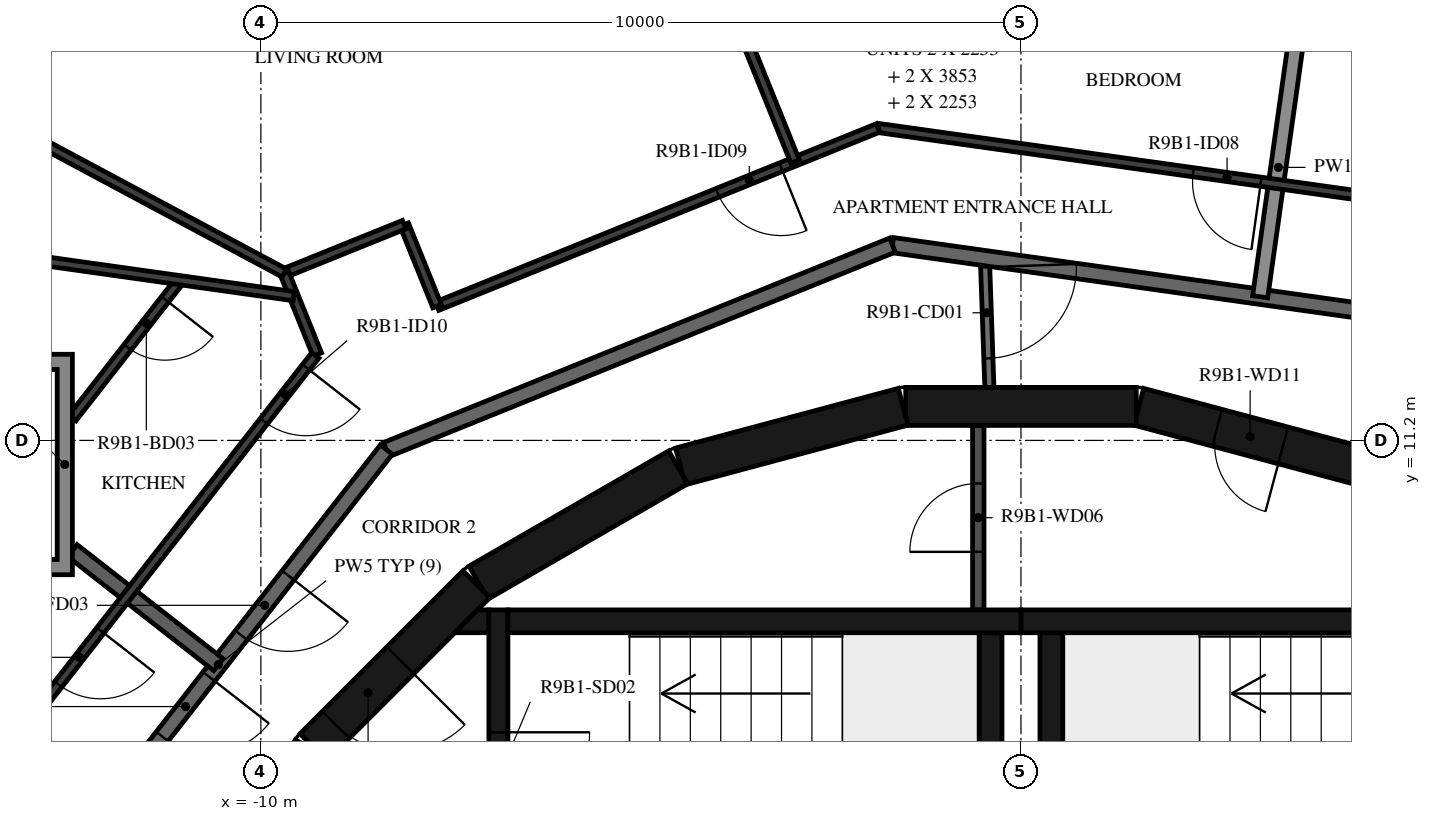
"""IFC4 building model, lengths in metres.
Left out: names, types, materials, properties, quantities, classifications, styles, units other than length and angle.
Written with IfcOpenShell. Run it as: python <this file> out.ifc"""

import sys

from ifc_helpers import new_model, si_unit, direction, frame, frame_2d, origin, place, context, subcontext, project, spatial, polyline, rectangle, outline, extrude, element, fill, save


model = new_model("IFC4")
c1 = context("Model", 3, precision=1e-05, world=origin(), true_north=direction((0.0, 1.0)))
c2 = subcontext(c1, "Body", "Model", "MODEL_VIEW")
j1 = project(units=[si_unit("LENGTHUNIT", "METRE"), si_unit("PLANEANGLEUNIT", "RADIAN")], contexts=[c1])
p1 = place(None, origin())
s1 = spatial("IfcSite", under=j1, at=p1, CompositionType="ELEMENT")
p2 = place(p1, origin())
s2 = spatial("IfcBuilding", under=s1, at=p2, CompositionType="ELEMENT")
p3 = place(p2, frame((0.0, 0.0, 343.5)))
s3 = spatial("IfcBuildingStorey", under=s2, at=p3, CompositionType="ELEMENT", Elevation=343.5)
p4 = place(p3, frame((4.479, 10.858, 0.0), z_axis=(0.0, 0.0, 1.0), x_axis=(-0.965948410781, 0.258734743916, 0.0)))
e1 = element("IfcWall", 1, at=p4, inside=s3, PredefinedType="SHEAR", context=c2, shape_type="SweptSolid", body=[
    extrude(rectangle(XDim=3.033, YDim=0.5, at=frame_2d((1.516, 0.0))), origin(), (0.0, 0.0, 1.0), 3.12),
])
p5 = place(p4, frame((1.066, 0.0, 0.0)))
e2 = element("IfcOpeningElement", 2, at=p5, cuts=e1, PredefinedType="OPENING", context=c2, shape_type="SweptSolid", body=[
    extrude(rectangle(XDim=0.9, YDim=2.1, at=frame_2d((0.45, 1.05))), frame((0.0, 0.26, 0.0), z_axis=(0.0, -1.0, 0.0), x_axis=(1.0, 0.0, 0.0)), (0.0, 0.0, 1.0), 0.52),
])
for number, where, z_axis, x_axis in (
    (3, (1.516, 11.647, 0.0), (0.0, 0.0, 1.0), (-1.0, 0.0, 0.0)),
    (4, (-1.55, 11.643, 0.0), (0.0, 0.0, 1.0), (-0.966, -0.259, 0.0)),
    (5, (-4.51, 10.845, 0.0), (0.0, 0.0, 1.0), (-0.866, -0.5, 0.0)),
):
    element("IfcWall", number, at=place(p3, frame(where, z_axis=z_axis, x_axis=x_axis)), inside=s3, PredefinedType="SHEAR", context=c2, shape_type="SweptSolid", body=[
        extrude(rectangle(XDim=3.033, YDim=0.5, at=frame_2d((1.516, 0.0))), origin(), (0.0, 0.0, 1.0), 3.12),
    ])
p6 = place(p3, frame((-7.164, 9.308, 0.0), z_axis=(0.0, 0.0, 1.0), x_axis=(-0.707106781187, -0.707106781187, 0.0)))
e6 = element("IfcWall", 6, at=p6, inside=s3, PredefinedType="SHEAR", context=c2, shape_type="SweptSolid", body=[
    extrude(rectangle(XDim=3.032, YDim=0.5, at=frame_2d((1.516, 0.0))), origin(), (0.0, 0.0, 1.0), 3.12),
])
p7 = place(p6, frame((1.416, 0.0, 0.0)))
e7 = element("IfcOpeningElement", 7, at=p7, cuts=e6, PredefinedType="OPENING", context=c2, shape_type="SweptSolid", body=[
    extrude(rectangle(XDim=1.2, YDim=2.1, at=frame_2d((0.6, 1.05))), frame((0.0, 0.26, 0.0), z_axis=(0.0, -1.0, 0.0), x_axis=(1.0, 0.0, 0.0)), (0.0, 0.0, 1.0), 0.52),
])
p8 = place(p3, frame((-9.329, 7.137, 0.0), z_axis=(0.0, 0.0, 1.0), x_axis=(-0.500087131594, -0.865975092491, 0.0)))
e8 = element("IfcWall", 8, at=p8, inside=s3, PredefinedType="SHEAR", context=c2, shape_type="SweptSolid", body=[
    extrude(rectangle(XDim=3.033, YDim=0.5, at=frame_2d((1.516, 0.0))), origin(), (0.0, 0.0, 1.0), 3.12),
])
p9 = place(p3, frame((0.0, 8.82, 0.0), z_axis=(0.0, 0.0, 1.0), x_axis=(1.0, 0.0, 0.0)))
e9 = element("IfcWall", 9, at=p9, inside=s3, PredefinedType="SHEAR", context=c2, shape_type="SweptSolid", body=[
    extrude(rectangle(XDim=6.75, YDim=0.3, at=frame_2d((3.375, 0.0))), origin(), (0.0, 0.0, 1.0), 3.12),
])
p10 = place(p3, frame((0.4, 5.35, 0.0), z_axis=(0.0, 0.0, 1.0), x_axis=(0.0, 1.0, 0.0)))
e10 = element("IfcWall", 10, at=p10, inside=s3, PredefinedType="SHEAR", context=c2, shape_type="SweptSolid", body=[
    extrude(rectangle(XDim=3.32, YDim=0.3, at=frame_2d((1.66, 0.0))), origin(), (0.0, 0.0, 1.0), 3.12),
])
p11 = place(p3, frame((-6.75, 8.82, 0.0), z_axis=(0.0, 0.0, 1.0), x_axis=(1.0, 0.0, 0.0)))
e11 = element("IfcWall", 11, at=p11, inside=s3, PredefinedType="SHEAR", context=c2, shape_type="SweptSolid", body=[
    extrude(rectangle(XDim=6.75, YDim=0.3, at=frame_2d((3.375, 0.0))), origin(), (0.0, 0.0, 1.0), 3.12),
])
p12 = place(p3, frame((-0.4, 5.35, 0.0), z_axis=(0.0, 0.0, 1.0), x_axis=(0.0, 1.0, 0.0)))
e12 = element("IfcWall", 12, at=p12, inside=s3, PredefinedType="SHEAR", context=c2, shape_type="SweptSolid", body=[
    extrude(rectangle(XDim=3.32, YDim=0.3, at=frame_2d((1.66, 0.0))), origin(), (0.0, 0.0, 1.0), 3.12),
])
p13 = place(p3, frame((-6.875, 8.97, 0.0), z_axis=(0.0, 0.0, 1.0), x_axis=(0.0, -1.0, 0.0)))
e13 = element("IfcWall", 13, at=p13, inside=s3, PredefinedType="SHEAR", context=c2, shape_type="SweptSolid", body=[
    extrude(rectangle(XDim=3.92, YDim=0.25, at=frame_2d((1.96, 0.0))), origin(), (0.0, 0.0, 1.0), 3.12),
])
p14 = place(p13, frame((1.61, 0.0, 0.0)))
e14 = element("IfcOpeningElement", 14, at=p14, cuts=e13, PredefinedType="OPENING", context=c2, shape_type="SweptSolid", body=[
    extrude(rectangle(XDim=1.2, YDim=2.1, at=frame_2d((0.6, 1.05))), frame((0.0, 0.135, 0.0), z_axis=(0.0, -1.0, 0.0), x_axis=(1.0, 0.0, 0.0)), (0.0, 0.0, 1.0), 0.27),
])
p15 = place(p3, origin())
e15 = element("IfcWall", 15, at=p15, inside=s3, PredefinedType="SHEAR", context=c2, shape_type="SweptSolid", body=[
    extrude(outline(polyline([(-7.148, 8.97), (-7.0, 8.97), (-7.0, 8.67), (-7.448, 8.67), (-7.148, 8.97)])), origin(), (0.0, 0.0, 1.0), 3.12),
])
p16 = place(p3, frame((-0.562, 8.97, 0.0), z_axis=(0.0, 0.0, 1.0), x_axis=(0.0, 1.0, 0.0)))
e16 = element("IfcWall", 16, at=p16, inside=s3, PredefinedType="PARTITIONING", context=c2, shape_type="SweptSolid", body=[
    extrude(rectangle(XDim=2.427, YDim=0.15, at=frame_2d((1.214, 0.0))), origin(), (0.0, 0.0, 1.0), 3.12),
])
p17 = place(p16, frame((0.764, 0.0, 0.0)))
e17 = element("IfcOpeningElement", 17, at=p17, cuts=e16, PredefinedType="OPENING", context=c2, shape_type="SweptSolid", body=[
    extrude(rectangle(XDim=0.9, YDim=2.1, at=frame_2d((0.45, 1.05))), frame((0.0, 0.085, 0.0), z_axis=(0.0, -1.0, 0.0), x_axis=(1.0, 0.0, 0.0)), (0.0, 0.0, 1.0), 0.17),
])
p18 = place(p3, frame((-0.475, 13.598, 0.0), z_axis=(0.0, 0.0, 1.0), x_axis=(0.034852521429, -0.999392466326, 0.0)))
e18 = element("IfcWall", 18, at=p18, inside=s3, PredefinedType="PARTITIONING", context=c2, shape_type="SweptSolid", body=[
    extrude(rectangle(XDim=1.702, YDim=0.12, at=frame_2d((0.851, 0.0))), origin(), (0.0, 0.0, 1.0), 3.12),
])
p19 = place(p18, frame((0.12, 0.0, 0.0)))
e19 = element("IfcOpeningElement", 19, at=p19, cuts=e18, PredefinedType="OPENING", context=c2, shape_type="SweptSolid", body=[
    extrude(rectangle(XDim=1.2, YDim=2.1, at=frame_2d((0.6, 1.05))), frame((0.0, 0.07, 0.0), z_axis=(0.0, -1.0, 0.0), x_axis=(1.0, 0.0, 0.0)), (0.0, 0.0, 1.0), 0.14),
])
p20 = place(p3, frame((5.42, 12.77, 0.0), z_axis=(0.0, 0.0, 1.0), x_axis=(-0.990270565508, 0.139155334385, 0.0)))
e20 = element("IfcWall", 20, at=p20, inside=s3, PredefinedType="STANDARD", context=c2, shape_type="SweptSolid", body=[
    extrude(rectangle(XDim=7.181, YDim=0.2, at=frame_2d((3.59, 0.0))), origin(), (0.0, 0.0, 1.0), 3.12),
])
p21 = place(p3, frame((-1.691, 13.769, 0.0), z_axis=(0.0, 0.0, 1.0), x_axis=(-0.92717916932, -0.374618189599, 0.0)))
e21 = element("IfcWall", 21, at=p21, inside=s3, PredefinedType="STANDARD", context=c2, shape_type="SweptSolid", body=[
    extrude(rectangle(XDim=7.181, YDim=0.2, at=frame_2d((3.591, 0.0))), origin(), (0.0, 0.0, 1.0), 3.12),
])
p22 = place(p3, frame((-8.349, 11.079, 0.0), z_axis=(0.0, 0.0, 1.0), x_axis=(-0.615669112324, -0.78800478687, 0.0)))
e22 = element("IfcWall", 22, at=p22, inside=s3, PredefinedType="STANDARD", context=c2, shape_type="SweptSolid", body=[
    extrude(rectangle(XDim=7.181, YDim=0.2, at=frame_2d((3.591, 0.0))), origin(), (0.0, 0.0, 1.0), 3.12),
])
p23 = place(p22, frame((2.1, 0.0, 0.0)))
e23 = element("IfcOpeningElement", 23, at=p23, cuts=e22, PredefinedType="OPENING", context=c2, shape_type="SweptSolid", body=[
    extrude(rectangle(XDim=1.0, YDim=2.1, at=frame_2d((0.5, 1.05))), frame((0.0, 0.11, 0.0), z_axis=(0.0, -1.0, 0.0), x_axis=(1.0, 0.0, 0.0)), (0.0, 0.0, 1.0), 0.22),
])
p24 = place(p22, frame((3.79, 0.0, 0.0)))
e24 = element("IfcOpeningElement", 24, at=p24, cuts=e22, PredefinedType="OPENING", context=c2, shape_type="SweptSolid", body=[
    extrude(rectangle(XDim=1.0, YDim=2.1, at=frame_2d((0.5, 1.05))), frame((0.0, 0.11, 0.0), z_axis=(0.0, -1.0, 0.0), x_axis=(1.0, 0.0, 0.0)), (0.0, 0.0, 1.0), 0.22),
])
p25 = place(p3, frame((3.625, 16.494, 0.0), z_axis=(0.0, 0.0, 1.0), x_axis=(-0.139174320859, -0.990267897295, 0.0)))
e25 = element("IfcWall", 25, at=p25, inside=s3, PredefinedType="STANDARD", context=c2, shape_type="SweptSolid", body=[
    extrude(rectangle(XDim=3.438, YDim=0.2, at=frame_2d((1.719, 0.0))), origin(), (0.0, 0.0, 1.0), 2.73),
])
p26 = place(p3, frame((-12.479, 9.75, 0.0), z_axis=(0.0, 0.0, 1.0), x_axis=(0.788050197026, -0.615610986717, 0.0)))
e26 = element("IfcWall", 26, at=p26, inside=s3, PredefinedType="STANDARD", context=c2, shape_type="SweptSolid", body=[
    extrude(rectangle(XDim=2.437, YDim=0.2, at=frame_2d((1.218, 0.0))), origin(), (0.0, 0.0, 1.0), 3.12),
])
p27 = place(p3, frame((6.027, 14.199, 0.0), z_axis=(0.0, 0.0, 1.0), x_axis=(-0.990271593532, 0.139148018469, 0.0)))
e27 = element("IfcWall", 27, at=p27, inside=s3, PredefinedType="PARTITIONING", context=c2, shape_type="SweptSolid", body=[
    extrude(rectangle(XDim=7.985, YDim=0.12, at=frame_2d((3.992, 0.0))), origin(), (0.0, 0.0, 1.0), 3.12),
])
p28 = place(p27, frame((2.898, 0.0, 0.0)))
e28 = element("IfcOpeningElement", 28, at=p28, cuts=e27, PredefinedType="OPENING", context=c2, shape_type="SweptSolid", body=[
    extrude(rectangle(XDim=0.9, YDim=2.1, at=frame_2d((0.45, 1.05))), frame((0.0, 0.07, 0.0), z_axis=(0.0, -1.0, 0.0), x_axis=(1.0, 0.0, 0.0)), (0.0, 0.0, 1.0), 0.14),
])
p29 = place(p3, frame((-1.88, 15.311, 0.0), z_axis=(0.0, 0.0, 1.0), x_axis=(-0.927182163322, -0.374610779365, 0.0)))
e29 = element("IfcWall", 29, at=p29, inside=s3, PredefinedType="PARTITIONING", context=c2, shape_type="SweptSolid", body=[
    extrude(rectangle(XDim=6.257, YDim=0.12, at=frame_2d((3.128, 0.0))), origin(), (0.0, 0.0, 1.0), 3.12),
])
p30 = place(p29, frame((1.377, 0.0, 0.0)))
e30 = element("IfcOpeningElement", 30, at=p30, cuts=e29, PredefinedType="OPENING", context=c2, shape_type="SweptSolid", body=[
    extrude(rectangle(XDim=0.9, YDim=2.1, at=frame_2d((0.45, 1.05))), frame((0.0, 0.07, 0.0), z_axis=(0.0, -1.0, 0.0), x_axis=(1.0, 0.0, 0.0)), (0.0, 0.0, 1.0), 0.14),
])
p31 = place(p3, frame((-7.681, 12.967, 0.0), z_axis=(0.0, 0.0, 1.0), x_axis=(-0.374592224266, 0.927189659951, 0.0)))
e31 = element("IfcWall", 31, at=p31, inside=s3, PredefinedType="PARTITIONING", context=c2, shape_type="SweptSolid", body=[
    extrude(rectangle(XDim=1.156, YDim=0.12, at=frame_2d((0.578, 0.0))), origin(), (0.0, 0.0, 1.0), 3.12),
])
p32 = place(p3, frame((-8.115, 14.039, 0.0), z_axis=(0.0, 0.0, 1.0), x_axis=(-0.927153589835, -0.374681492546, 0.0)))
e32 = element("IfcWall", 32, at=p32, inside=s3, PredefinedType="PARTITIONING", context=c2, shape_type="SweptSolid", body=[
    extrude(rectangle(XDim=1.7, YDim=0.12, at=frame_2d((0.85, 0.0))), origin(), (0.0, 0.0, 1.0), 3.12),
])
p33 = place(p3, frame((-9.691, 13.402, 0.0), z_axis=(0.0, 0.0, 1.0), x_axis=(0.374484003097, -0.927233374844, 0.0)))
e33 = element("IfcWall", 33, at=p33, inside=s3, PredefinedType="PARTITIONING", context=c2, shape_type="SweptSolid", body=[
    extrude(rectangle(XDim=1.156, YDim=0.12, at=frame_2d((0.578, 0.0))), origin(), (0.0, 0.0, 1.0), 3.12),
])
p34 = place(p3, frame((-9.283, 12.319, 0.0), z_axis=(0.0, 0.0, 1.0), x_axis=(-0.61567489546, -0.788000268464, 0.0)))
e34 = element("IfcWall", 34, at=p34, inside=s3, PredefinedType="PARTITIONING", context=c2, shape_type="SweptSolid", body=[
    extrude(rectangle(XDim=7.985, YDim=0.12, at=frame_2d((3.992, 0.0))), origin(), (0.0, 0.0, 1.0), 3.12),
])
p35 = place(p34, frame((0.2, 0.0, 0.0)))
e35 = element("IfcOpeningElement", 35, at=p35, cuts=e34, PredefinedType="OPENING", context=c2, shape_type="SweptSolid", body=[
    extrude(rectangle(XDim=0.9, YDim=2.1, at=frame_2d((0.45, 1.05))), frame((0.0, 0.07, 0.0), z_axis=(0.0, -1.0, 0.0), x_axis=(1.0, 0.0, 0.0)), (0.0, 0.0, 1.0), 0.14),
])
p36 = place(p34, frame((4.592, 0.0, 0.0)))
e36 = element("IfcOpeningElement", 36, at=p36, cuts=e34, PredefinedType="OPENING", context=c2, shape_type="SweptSolid", body=[
    extrude(rectangle(XDim=0.9, YDim=2.1, at=frame_2d((0.45, 1.05))), frame((0.0, 0.07, 0.0), z_axis=(0.0, -1.0, 0.0), x_axis=(1.0, 0.0, 0.0)), (0.0, 0.0, 1.0), 0.14),
])
p37 = place(p3, frame((-4.065, 17.575, 0.0), z_axis=(0.0, 0.0, 1.0), x_axis=(0.374619347258, -0.927178701578, 0.0)))
e37 = element("IfcWall", 37, at=p37, inside=s3, PredefinedType="PARTITIONING", context=c2, shape_type="SweptSolid", body=[
    extrude(rectangle(XDim=2.918, YDim=0.12, at=frame_2d((1.459, 0.0))), origin(), (0.0, 0.0, 1.0), 3.12),
])
p38 = place(p3, frame((-17.896, 17.797, 0.0), z_axis=(0.0, 0.0, 1.0), x_axis=(0.88150492406, -0.4721748287, 0.0)))
e38 = element("IfcWall", 38, at=p38, inside=s3, PredefinedType="PARTITIONING", context=c2, shape_type="SweptSolid", body=[
    extrude(rectangle(XDim=9.308, YDim=0.12, at=frame_2d((4.654, 0.0))), origin(), (0.0, 0.0, 1.0), 3.12),
])
p39 = place(p38, frame((0.6, 0.0, 0.0)))
e39 = element("IfcOpeningElement", 39, at=p39, cuts=e38, PredefinedType="OPENING", context=c2, shape_type="SweptSolid", body=[
    extrude(rectangle(XDim=0.9, YDim=2.1, at=frame_2d((0.45, 1.05))), frame((0.0, 0.07, 0.0), z_axis=(0.0, -1.0, 0.0), x_axis=(1.0, 0.0, 0.0)), (0.0, 0.0, 1.0), 0.14),
])
p40 = place(p3, frame((-11.064, 13.308, 0.0), z_axis=(0.0, 0.0, 1.0), x_axis=(-0.615681126827, -0.787995399777, 0.0)))
e40 = element("IfcWall", 40, at=p40, inside=s3, PredefinedType="PARTITIONING", context=c2, shape_type="SweptSolid", body=[
    extrude(rectangle(XDim=2.3, YDim=0.12, at=frame_2d((1.15, 0.0))), origin(), (0.0, 0.0, 1.0), 3.12),
])
p41 = place(p40, frame((0.32, 0.0, 0.0)))
e41 = element("IfcOpeningElement", 41, at=p41, cuts=e40, PredefinedType="OPENING", context=c2, shape_type="SweptSolid", body=[
    extrude(rectangle(XDim=0.8, YDim=2.1, at=frame_2d((0.4, 1.05))), frame((0.0, 0.07, 0.0), z_axis=(0.0, -1.0, 0.0), x_axis=(1.0, 0.0, 0.0)), (0.0, 0.0, 1.0), 0.14),
])
p42 = place(p3, frame((-9.568, 13.097, 0.0), z_axis=(0.0, 0.0, 1.0), x_axis=(-0.990266931728, 0.13918119099, 0.0)))
e42 = element("IfcWall", 42, at=p42, inside=s3, PredefinedType="PARTITIONING", context=c2, shape_type="SweptSolid", body=[
    extrude(rectangle(XDim=3.708, YDim=0.12, at=frame_2d((1.854, 0.0))), origin(), (0.0, 0.0, 1.0), 3.12),
])
p43 = place(p3, origin())
e43 = element("IfcWall", 43, at=p43, inside=s3, PredefinedType="STANDARD", context=c2, shape_type="SweptSolid", body=[
    extrude(outline(polyline([(-12.479, 12.333), (-12.479, 9.433), (-15.379, 9.433), (-15.379, 12.333), (-12.479, 12.333)]), holes=[polyline([(-15.179, 9.633), (-12.679, 9.633), (-12.679, 12.133), (-15.179, 12.133), (-15.179, 9.633)])]), origin(), (0.0, 0.0, 1.0), 3.12),
])
p44 = place(p14, origin())
e44 = element("IfcDoor", 44, at=p44, inside=s3, OperationType="SINGLE_SWING_LEFT", PredefinedType="DOOR", context=c2, shape_type="SweptSolid", body=[
    extrude(rectangle(XDim=1.2, YDim=2.1, at=frame_2d((0.6, 1.05))), frame((0.0, 0.025, 0.0), z_axis=(0.0, -1.0, 0.0), x_axis=(1.0, 0.0, 0.0)), (0.0, 0.0, 1.0), 0.05),
])
fill(e14, e44)
p45 = place(p7, origin())
e45 = element("IfcDoor", 45, at=p45, inside=s3, OperationType="SINGLE_SWING_RIGHT", PredefinedType="DOOR", context=c2, shape_type="SweptSolid", body=[
    extrude(rectangle(XDim=1.2, YDim=2.1, at=frame_2d((0.6, 1.05))), frame((0.0, 0.025, 0.0), z_axis=(0.0, -1.0, 0.0), x_axis=(1.0, 0.0, 0.0)), (0.0, 0.0, 1.0), 0.05),
])
fill(e7, e45)
p46 = place(p17, origin())
e46 = element("IfcDoor", 46, at=p46, inside=s3, OperationType="SINGLE_SWING_RIGHT", PredefinedType="DOOR", context=c2, shape_type="SweptSolid", body=[
    extrude(rectangle(XDim=0.9, YDim=2.1, at=frame_2d((0.45, 1.05))), frame((0.0, 0.025, 0.0), z_axis=(0.0, -1.0, 0.0), x_axis=(1.0, 0.0, 0.0)), (0.0, 0.0, 1.0), 0.05),
])
fill(e17, e46)
p47 = place(p5, origin())
e47 = element("IfcDoor", 47, at=p47, inside=s3, OperationType="SINGLE_SWING_LEFT", PredefinedType="DOOR", context=c2, shape_type="SweptSolid", body=[
    extrude(rectangle(XDim=0.9, YDim=2.1, at=frame_2d((0.45, 1.05))), frame((0.0, 0.025, 0.0), z_axis=(0.0, -1.0, 0.0), x_axis=(1.0, 0.0, 0.0)), (0.0, 0.0, 1.0), 0.05),
])
fill(e2, e47)
p48 = place(p23, origin())
e48 = element("IfcDoor", 48, at=p48, inside=s3, OperationType="SINGLE_SWING_RIGHT", PredefinedType="DOOR", context=c2, shape_type="SweptSolid", body=[
    extrude(rectangle(XDim=1.0, YDim=2.1, at=frame_2d((0.5, 1.05))), frame((0.0, 0.025, 0.0), z_axis=(0.0, -1.0, 0.0), x_axis=(1.0, 0.0, 0.0)), (0.0, 0.0, 1.0), 0.05),
])
fill(e23, e48)
p49 = place(p28, origin())
e49 = element("IfcDoor", 49, at=p49, inside=s3, OperationType="SINGLE_SWING_LEFT", PredefinedType="DOOR", context=c2, shape_type="SweptSolid", body=[
    extrude(rectangle(XDim=0.9, YDim=2.1, at=frame_2d((0.45, 1.05))), frame((0.0, 0.025, 0.0), z_axis=(0.0, -1.0, 0.0), x_axis=(1.0, 0.0, 0.0)), (0.0, 0.0, 1.0), 0.05),
])
fill(e28, e49)
p50 = place(p30, origin())
e50 = element("IfcDoor", 50, at=p50, inside=s3, OperationType="SINGLE_SWING_RIGHT", PredefinedType="DOOR", context=c2, shape_type="SweptSolid", body=[
    extrude(rectangle(XDim=0.9, YDim=2.1, at=frame_2d((0.45, 1.05))), frame((0.0, 0.025, 0.0), z_axis=(0.0, -1.0, 0.0), x_axis=(1.0, 0.0, 0.0)), (0.0, 0.0, 1.0), 0.05),
])
fill(e30, e50)
p51 = place(p35, origin())
e51 = element("IfcDoor", 51, at=p51, inside=s3, OperationType="SINGLE_SWING_RIGHT", PredefinedType="DOOR", context=c2, shape_type="SweptSolid", body=[
    extrude(rectangle(XDim=0.9, YDim=2.1, at=frame_2d((0.45, 1.05))), frame((0.0, 0.025, 0.0), z_axis=(0.0, -1.0, 0.0), x_axis=(1.0, 0.0, 0.0)), (0.0, 0.0, 1.0), 0.05),
])
fill(e35, e51)
p52 = place(p41, origin())
e52 = element("IfcDoor", 52, at=p52, inside=s3, OperationType="SINGLE_SWING_RIGHT", PredefinedType="DOOR", context=c2, shape_type="SweptSolid", body=[
    extrude(rectangle(XDim=0.8, YDim=2.1, at=frame_2d((0.4, 1.05))), frame((0.0, 0.025, 0.0), z_axis=(0.0, -1.0, 0.0), x_axis=(1.0, 0.0, 0.0)), (0.0, 0.0, 1.0), 0.05),
])
fill(e41, e52)
p53 = place(p24, origin())
e53 = element("IfcDoor", 53, at=p53, inside=s3, OperationType="SINGLE_SWING_LEFT", PredefinedType="DOOR", context=c2, shape_type="SweptSolid", body=[
    extrude(rectangle(XDim=1.0, YDim=2.1, at=frame_2d((0.5, 1.05))), frame((0.0, 0.025, 0.0), z_axis=(0.0, -1.0, 0.0), x_axis=(1.0, 0.0, 0.0)), (0.0, 0.0, 1.0), 0.05),
])
fill(e24, e53)
p54 = place(p36, origin())
e54 = element("IfcDoor", 54, at=p54, inside=s3, OperationType="SINGLE_SWING_LEFT", PredefinedType="DOOR", context=c2, shape_type="SweptSolid", body=[
    extrude(rectangle(XDim=0.9, YDim=2.1, at=frame_2d((0.45, 1.05))), frame((0.0, 0.025, 0.0), z_axis=(0.0, -1.0, 0.0), x_axis=(1.0, 0.0, 0.0)), (0.0, 0.0, 1.0), 0.05),
])
fill(e36, e54)
p55 = place(p19, origin())
e55 = element("IfcDoor", 55, at=p55, inside=s3, OperationType="DOUBLE_DOOR_SINGLE_SWING", PredefinedType="DOOR", context=c2, shape_type="SweptSolid", body=[
    extrude(rectangle(XDim=1.2, YDim=2.1, at=frame_2d((0.6, 1.05))), frame((0.0, 0.025, 0.0), z_axis=(0.0, -1.0, 0.0), x_axis=(1.0, 0.0, 0.0)), (0.0, 0.0, 1.0), 0.05),
])
fill(e19, e55)
save(model, sys.argv[1])
